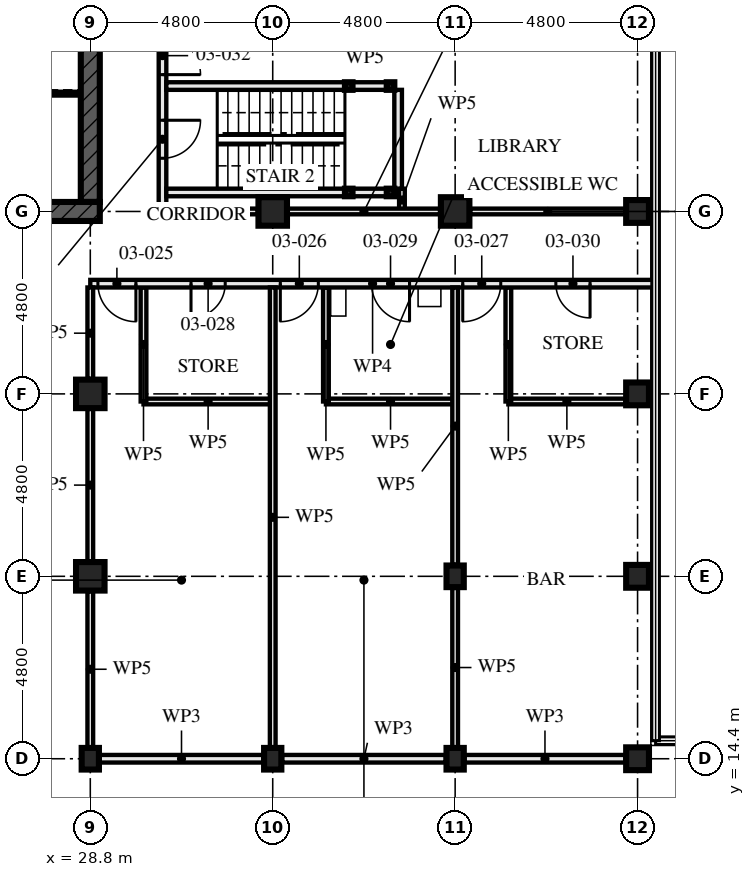
"""IFC4 building model, lengths in metres.
Left out: names, types, materials, properties, quantities, classifications, styles, units other than length and angle.
Written with IfcOpenShell. Run it as: python <this file> out.ifc"""

import sys

from ifc_helpers import new_model, si_unit, direction, frame, frame_2d, origin, origin_2d, place, context, subcontext, project, spatial, rectangle, hollow_rectangle, i_section, extrude, element, fill, save


model = new_model("IFC4")
c1 = context("Model", 3, precision=1e-05, world=origin(), true_north=direction((0.0, 1.0)))
c2 = subcontext(c1, "Body", "Model", "MODEL_VIEW")
j1 = project(units=[si_unit("LENGTHUNIT", "METRE"), si_unit("PLANEANGLEUNIT", "RADIAN")], contexts=[c1])
p1 = place(None, origin())
s1 = spatial("IfcSite", under=j1, at=p1, CompositionType="ELEMENT")
p2 = place(p1, origin())
s2 = spatial("IfcBuilding", under=s1, at=p2, CompositionType="ELEMENT")
p3 = place(p2, frame((0.0, 0.0, 13.5)))
s3 = spatial("IfcBuildingStorey", under=s2, at=p3, CompositionType="ELEMENT", Elevation=13.5)
p4 = place(p3, frame((28.8, 14.4, 0.0), z_axis=(0.0, 0.0, 1.0), x_axis=(1.0, 0.0, 0.0)))
e1 = element("IfcColumn", 1, at=p4, inside=s3, PredefinedType="COLUMN", context=c2, shape_type="SweptSolid", body=[
    extrude(i_section(OverallWidth=0.454, OverallDepth=0.569, WebThickness=0.078, FlangeThickness=0.125, FilletRadius=0.015, at=origin_2d()), origin(), (0.0, 0.0, 1.0), 4.5),
])
for number, where, z_axis, x_axis in (
    (2, (28.8, 19.2, 0.0), (0.0, 0.0, 1.0), (1.0, 0.0, 0.0)),
    (3, (28.8, 24.0, 0.0), (0.0, 0.0, 1.0), (1.0, 0.0, 0.0)),
):
    element("IfcColumn", number, at=place(p3, frame(where, z_axis=z_axis, x_axis=x_axis)), inside=s3, PredefinedType="COLUMN", context=c2, shape_type="SweptSolid", body=[
        extrude(hollow_rectangle(XDim=0.75, YDim=0.75, WallThickness=0.08, at=origin_2d()), origin(), (0.0, 0.0, 1.0), 4.5),
    ])
p5 = place(p3, frame((33.6, 14.4, 0.0), z_axis=(0.0, 0.0, 1.0), x_axis=(1.0, 0.0, 0.0)))
e4 = element("IfcColumn", 4, at=p5, inside=s3, PredefinedType="COLUMN", context=c2, shape_type="SweptSolid", body=[
    extrude(i_section(OverallWidth=0.454, OverallDepth=0.569, WebThickness=0.078, FlangeThickness=0.125, FilletRadius=0.015, at=origin_2d()), origin(), (0.0, 0.0, 1.0), 4.5),
])
p6 = place(p3, frame((33.6, 28.8, 0.0), z_axis=(0.0, 0.0, 1.0), x_axis=(0.0, 1.0, 0.0)))
e5 = element("IfcColumn", 5, at=p6, inside=s3, PredefinedType="COLUMN", context=c2, shape_type="SweptSolid", body=[
    extrude(hollow_rectangle(XDim=0.75, YDim=0.75, WallThickness=0.08, at=origin_2d()), origin(), (0.0, 0.0, 1.0), 4.5),
])
for number, where, z_axis, x_axis in (
    (6, (38.4, 14.4, 0.0), (0.0, 0.0, 1.0), (1.0, 0.0, 0.0)),
    (7, (38.4, 19.2, 0.0), (0.0, 0.0, 1.0), (1.0, 0.0, 0.0)),
):
    element("IfcColumn", number, at=place(p3, frame(where, z_axis=z_axis, x_axis=x_axis)), inside=s3, PredefinedType="COLUMN", context=c2, shape_type="SweptSolid", body=[
        extrude(i_section(OverallWidth=0.454, OverallDepth=0.569, WebThickness=0.078, FlangeThickness=0.125, FilletRadius=0.015, at=origin_2d()), origin(), (0.0, 0.0, 1.0), 4.5),
    ])
p7 = place(p3, frame((38.4, 28.8, 0.0), z_axis=(0.0, 0.0, 1.0), x_axis=(0.0, 1.0, 0.0)))
e8 = element("IfcColumn", 8, at=p7, inside=s3, PredefinedType="COLUMN", context=c2, shape_type="SweptSolid", body=[
    extrude(hollow_rectangle(XDim=0.75, YDim=0.75, WallThickness=0.08, at=origin_2d()), origin(), (0.0, 0.0, 1.0), 4.5),
])
p8 = place(p3, frame((43.2, 14.4, 0.0), z_axis=(0.0, 0.0, 1.0), x_axis=(0.0, 1.0, 0.0)))
e9 = element("IfcColumn", 9, at=p8, inside=s3, PredefinedType="COLUMN", context=c2, shape_type="SweptSolid", body=[
    extrude(hollow_rectangle(XDim=0.6, YDim=0.6, WallThickness=0.05, at=origin_2d()), origin(), (0.0, 0.0, 1.0), 4.5),
])
for number, where, z_axis, x_axis in (
    (10, (43.2, 19.2, 0.0), (0.0, 0.0, 1.0), (1.0, 0.0, 0.0)),
    (11, (43.2, 24.0, 0.0), (0.0, 0.0, 1.0), (1.0, 0.0, 0.0)),
    (12, (43.2, 28.8, 0.0), (0.0, 0.0, 1.0), (0.0, 1.0, 0.0)),
):
    element("IfcColumn", number, at=place(p3, frame(where, z_axis=z_axis, x_axis=x_axis)), inside=s3, PredefinedType="COLUMN", context=c2, shape_type="SweptSolid", body=[
        extrude(hollow_rectangle(XDim=0.6, YDim=0.6, WallThickness=0.08, at=origin_2d()), origin(), (0.0, 0.0, 1.0), 4.5),
    ])
p9 = place(p3, frame((14.15, 28.8, -0.17), z_axis=(0.0, 0.0, 1.0), x_axis=(1.0, 0.0, 0.0)))
e13 = element("IfcWall", 13, at=p9, inside=s3, PredefinedType="SHEAR", context=c2, shape_type="SweptSolid", body=[
    extrude(rectangle(XDim=14.9, YDim=0.5, at=frame_2d((7.45, 0.0))), origin(), (0.0, 0.0, 1.0), 4.5),
])
p10 = place(p9, frame((6.85, 0.0, 0.17)))
e14 = element("IfcOpeningElement", 14, at=p10, cuts=e13, PredefinedType="OPENING", context=c2, shape_type="SweptSolid", body=[
    extrude(rectangle(XDim=1.2, YDim=2.1, at=frame_2d((0.6, 1.05))), frame((0.0, 0.26, 0.0), z_axis=(0.0, -1.0, 0.0), x_axis=(1.0, 0.0, 0.0)), (0.0, 0.0, 1.0), 0.521),
])
p11 = place(p3, frame((28.8, 29.05, -0.17), z_axis=(0.0, 0.0, 1.0), x_axis=(0.0, 1.0, 0.0)))
e15 = element("IfcWall", 15, at=p11, inside=s3, PredefinedType="SHEAR", context=c2, shape_type="SweptSolid", body=[
    extrude(rectangle(XDim=13.9, YDim=0.5, at=frame_2d((6.95, 0.0))), origin(), (0.0, 0.0, 1.0), 4.5),
])
p12 = place(p11, frame((6.35, 0.0, 0.17)))
e16 = element("IfcOpeningElement", 16, at=p12, cuts=e15, PredefinedType="OPENING", context=c2, shape_type="SweptSolid", body=[
    extrude(rectangle(XDim=1.2, YDim=2.1, at=frame_2d((0.6, 1.05))), frame((0.0, 0.26, 0.0), z_axis=(0.0, -1.0, 0.0), x_axis=(1.0, 0.0, 0.0)), (0.0, 0.0, 1.0), 0.521),
])
for number, where, z_axis, x_axis in (
    (17, (36.7, 29.3, 0.0), (0.0, 0.0, 1.0), (1.0, 0.0, 0.0)),
    (18, (36.7, 32.1, 0.0), (0.0, 0.0, 1.0), (1.0, 0.0, 0.0)),
    (19, (35.6, 29.3, 0.0), (0.0, 0.0, 1.0), (1.0, 0.0, 0.0)),
    (20, (35.6, 32.1, 0.0), (0.0, 0.0, 1.0), (1.0, 0.0, 0.0)),
):
    element("IfcColumn", number, at=place(p3, frame(where, z_axis=z_axis, x_axis=x_axis)), inside=s3, PredefinedType="COLUMN", context=c2, shape_type="SweptSolid", body=[
        extrude(hollow_rectangle(XDim=0.2, YDim=0.2, WallThickness=0.008, at=origin_2d()), origin(), (0.0, 0.0, 1.0), 4.33),
    ])
p13 = place(p3, frame((30.2, 23.8, 0.0), z_axis=(0.0, 0.0, 1.0), x_axis=(0.0, 1.0, 0.0)))
e21 = element("IfcWall", 21, at=p13, inside=s3, PredefinedType="PARTITIONING", context=c2, shape_type="SweptSolid", body=[
    extrude(rectangle(XDim=3.0, YDim=0.15, at=frame_2d((1.5, 0.0))), origin(), (0.0, 0.0, 1.0), 3.55),
])
p14 = place(p3, frame((30.2, 23.8, 0.0), z_axis=(0.0, 0.0, 1.0), x_axis=(1.0, 0.0, 0.0)))
e22 = element("IfcWall", 22, at=p14, inside=s3, PredefinedType="PARTITIONING", context=c2, shape_type="SweptSolid", body=[
    extrude(rectangle(XDim=3.4, YDim=0.15, at=frame_2d((1.7, 0.0))), origin(), (0.0, 0.0, 1.0), 4.33),
])
p15 = place(p3, frame((35.0, 23.8, 0.0), z_axis=(0.0, 0.0, 1.0), x_axis=(0.0, 1.0, 0.0)))
e23 = element("IfcWall", 23, at=p15, inside=s3, PredefinedType="PARTITIONING", context=c2, shape_type="SweptSolid", body=[
    extrude(rectangle(XDim=3.0, YDim=0.15, at=frame_2d((1.5, 0.0))), origin(), (0.0, 0.0, 1.0), 3.55),
])
p16 = place(p3, frame((35.0, 23.8, 0.0), z_axis=(0.0, 0.0, 1.0), x_axis=(1.0, 0.0, 0.0)))
e24 = element("IfcWall", 24, at=p16, inside=s3, PredefinedType="PARTITIONING", context=c2, shape_type="SweptSolid", body=[
    extrude(rectangle(XDim=3.4, YDim=0.15, at=frame_2d((1.7, 0.0))), origin(), (0.0, 0.0, 1.0), 4.33),
])
p17 = place(p3, frame((39.8, 23.8, 0.0), z_axis=(0.0, 0.0, 1.0), x_axis=(0.0, 1.0, 0.0)))
e25 = element("IfcWall", 25, at=p17, inside=s3, PredefinedType="PARTITIONING", context=c2, shape_type="SweptSolid", body=[
    extrude(rectangle(XDim=3.0, YDim=0.15, at=frame_2d((1.5, 0.0))), origin(), (0.0, 0.0, 1.0), 3.55),
])
p18 = place(p3, frame((39.8, 23.8, 0.0), z_axis=(0.0, 0.0, 1.0), x_axis=(1.0, 0.0, 0.0)))
e26 = element("IfcWall", 26, at=p18, inside=s3, PredefinedType="PARTITIONING", context=c2, shape_type="SweptSolid", body=[
    extrude(rectangle(XDim=3.08, YDim=0.15, at=frame_2d((1.54, 0.0))), origin(), (0.0, 0.0, 1.0), 4.33),
])
p19 = place(p3, frame((33.6, 14.705, 0.0), z_axis=(0.0, 0.0, 1.0), x_axis=(0.0, 1.0, 0.0)))
e27 = element("IfcWall", 27, at=p19, inside=s3, PredefinedType="PARTITIONING", context=c2, shape_type="SweptSolid", body=[
    extrude(rectangle(XDim=12.095, YDim=0.15, at=frame_2d((6.048, 0.0))), origin(), (0.0, 0.0, 1.0), 3.55),
])
p20 = place(p3, frame((38.4, 14.705, 0.0), z_axis=(0.0, 0.0, 1.0), x_axis=(0.0, 1.0, 0.0)))
e28 = element("IfcWall", 28, at=p20, inside=s3, PredefinedType="PARTITIONING", context=c2, shape_type="SweptSolid", body=[
    extrude(rectangle(XDim=4.191, YDim=0.15, at=frame_2d((2.095, 0.0))), origin(), (0.0, 0.0, 1.0), 3.55),
])
p21 = place(p3, frame((38.4, 19.504, 0.0), z_axis=(0.0, 0.0, 1.0), x_axis=(0.0, 1.0, 0.0)))
e29 = element("IfcWall", 29, at=p21, inside=s3, PredefinedType="PARTITIONING", context=c2, shape_type="SweptSolid", body=[
    extrude(rectangle(XDim=7.296, YDim=0.15, at=frame_2d((3.648, 0.0))), origin(), (0.0, 0.0, 1.0), 3.55),
])
p22 = place(p3, frame((28.8, 26.9, 0.0), z_axis=(0.0, 0.0, 1.0), x_axis=(1.0, 0.0, 0.0)))
e30 = element("IfcWall", 30, at=p22, inside=s3, PredefinedType="PARTITIONING", context=c2, shape_type="SweptSolid", body=[
    extrude(rectangle(XDim=14.855, YDim=0.2, at=frame_2d((7.427, 0.0))), origin(), (0.0, 0.0, 1.0), 3.32),
])
p23 = place(p22, frame((0.2, 0.0, 0.0)))
e31 = element("IfcOpeningElement", 31, at=p23, cuts=e30, PredefinedType="OPENING", context=c2, shape_type="SweptSolid", body=[
    extrude(rectangle(XDim=1.0, YDim=2.4, at=frame_2d((0.5, 1.2))), frame((0.0, 0.111, 0.0), z_axis=(0.0, -1.0, 0.0), x_axis=(1.0, 0.0, 0.0)), (0.0, 0.0, 1.0), 0.221),
])
p24 = place(p22, frame((5.0, 0.0, 0.0)))
e32 = element("IfcOpeningElement", 32, at=p24, cuts=e30, PredefinedType="OPENING", context=c2, shape_type="SweptSolid", body=[
    extrude(rectangle(XDim=1.0, YDim=2.4, at=frame_2d((0.5, 1.2))), frame((0.0, 0.111, 0.0), z_axis=(0.0, -1.0, 0.0), x_axis=(1.0, 0.0, 0.0)), (0.0, 0.0, 1.0), 0.221),
])
p25 = place(p22, frame((9.8, 0.0, 0.0)))
e33 = element("IfcOpeningElement", 33, at=p25, cuts=e30, PredefinedType="OPENING", context=c2, shape_type="SweptSolid", body=[
    extrude(rectangle(XDim=1.0, YDim=2.4, at=frame_2d((0.5, 1.2))), frame((0.0, 0.111, 0.0), z_axis=(0.0, -1.0, 0.0), x_axis=(1.0, 0.0, 0.0)), (0.0, 0.0, 1.0), 0.221),
])
p26 = place(p22, frame((2.65, 0.0, 0.0)))
e34 = element("IfcOpeningElement", 34, at=p26, cuts=e30, PredefinedType="OPENING", context=c2, shape_type="SweptSolid", body=[
    extrude(rectangle(XDim=0.9, YDim=2.1, at=frame_2d((0.45, 1.05))), frame((0.0, 0.111, 0.0), z_axis=(0.0, -1.0, 0.0), x_axis=(1.0, 0.0, 0.0)), (0.0, 0.0, 1.0), 0.221),
])
p27 = place(p22, frame((7.4, 0.0, 0.0)))
e35 = element("IfcOpeningElement", 35, at=p27, cuts=e30, PredefinedType="OPENING", context=c2, shape_type="SweptSolid", body=[
    extrude(rectangle(XDim=1.0, YDim=2.1, at=frame_2d((0.5, 1.05))), frame((0.0, 0.111, 0.0), z_axis=(0.0, -1.0, 0.0), x_axis=(1.0, 0.0, 0.0)), (0.0, 0.0, 1.0), 0.221),
])
p28 = place(p22, frame((12.25, 0.0, 0.0)))
e36 = element("IfcOpeningElement", 36, at=p28, cuts=e30, PredefinedType="OPENING", context=c2, shape_type="SweptSolid", body=[
    extrude(rectangle(XDim=0.9, YDim=2.1, at=frame_2d((0.45, 1.05))), frame((0.0, 0.111, 0.0), z_axis=(0.0, -1.0, 0.0), x_axis=(1.0, 0.0, 0.0)), (0.0, 0.0, 1.0), 0.221),
])
p29 = place(p3, frame((36.6, 29.3, 0.0), z_axis=(0.0, 0.0, 1.0), x_axis=(-1.0, 0.0, 0.0)))
e37 = element("IfcWall", 37, at=p29, inside=s3, PredefinedType="SOLIDWALL", context=c2, shape_type="SweptSolid", body=[
    extrude(rectangle(XDim=0.9, YDim=0.2, at=frame_2d((0.45, 0.0))), origin(), (0.0, 0.0, 1.0), 3.99),
])
p30 = place(p3, frame((35.5, 29.3, 0.0), z_axis=(0.0, 0.0, 1.0), x_axis=(-1.0, 0.0, 0.0)))
e38 = element("IfcWall", 38, at=p30, inside=s3, PredefinedType="SOLIDWALL", context=c2, shape_type="SweptSolid", body=[
    extrude(rectangle(XDim=4.7, YDim=0.2, at=frame_2d((2.35, 0.0))), origin(), (0.0, 0.0, 1.0), 3.99),
])
p31 = place(p3, frame((36.6, 32.1, 0.0), z_axis=(0.0, 0.0, 1.0), x_axis=(-1.0, 0.0, 0.0)))
e39 = element("IfcWall", 39, at=p31, inside=s3, PredefinedType="SOLIDWALL", context=c2, shape_type="SweptSolid", body=[
    extrude(rectangle(XDim=0.9, YDim=0.2, at=frame_2d((0.45, 0.0))), origin(), (0.0, 0.0, 1.0), 3.99),
])
p32 = place(p3, frame((35.5, 32.1, 0.0), z_axis=(0.0, 0.0, 1.0), x_axis=(-1.0, 0.0, 0.0)))
e40 = element("IfcWall", 40, at=p32, inside=s3, PredefinedType="SOLIDWALL", context=c2, shape_type="SweptSolid", body=[
    extrude(rectangle(XDim=4.7, YDim=0.2, at=frame_2d((2.35, 0.0))), origin(), (0.0, 0.0, 1.0), 3.99),
])
p33 = place(p3, frame((36.9, 29.4, 0.0), z_axis=(0.0, 0.0, 1.0), x_axis=(0.0, 1.0, 0.0)))
e41 = element("IfcWall", 41, at=p33, inside=s3, PredefinedType="SOLIDWALL", context=c2, shape_type="SweptSolid", body=[
    extrude(rectangle(XDim=2.6, YDim=0.2, at=frame_2d((1.3, 0.0))), origin(), (0.0, 0.0, 1.0), 4.33),
])
p34 = place(p3, frame((37.0, 28.8, 0.0), z_axis=(0.0, 0.0, 1.0), x_axis=(0.0, 1.0, 0.0)))
e42 = element("IfcWall", 42, at=p34, inside=s3, PredefinedType="PARTITIONING", context=c2, shape_type="SweptSolid", body=[
    extrude(rectangle(XDim=0.6, YDim=0.15, at=frame_2d((0.3, 0.0))), origin(), (0.0, 0.0, 1.0), 4.33),
])
p35 = place(p3, frame((30.7, 28.8, 0.0), z_axis=(0.0, 0.0, 1.0), x_axis=(0.0, 1.0, 0.0)))
e43 = element("IfcWall", 43, at=p35, inside=s3, PredefinedType="PARTITIONING", context=c2, shape_type="SweptSolid", body=[
    extrude(rectangle(XDim=14.4, YDim=0.2, at=frame_2d((7.2, 0.0))), origin(), (0.0, 0.0, 1.0), 3.55),
])
p36 = place(p35, frame((1.4, 0.0, 0.0)))
e44 = element("IfcOpeningElement", 44, at=p36, cuts=e43, PredefinedType="OPENING", context=c2, shape_type="SweptSolid", body=[
    extrude(rectangle(XDim=1.0, YDim=2.1, at=frame_2d((0.5, 1.05))), frame((0.0, 0.111, 0.0), z_axis=(0.0, -1.0, 0.0), x_axis=(1.0, 0.0, 0.0)), (0.0, 0.0, 1.0), 0.221),
])
p37 = place(p35, frame((3.6, 0.0, 0.0)))
e45 = element("IfcOpeningElement", 45, at=p37, cuts=e43, PredefinedType="OPENING", context=c2, shape_type="SweptSolid", body=[
    extrude(rectangle(XDim=1.0, YDim=2.4, at=frame_2d((0.5, 1.2))), frame((0.0, 0.111, 0.0), z_axis=(0.0, -1.0, 0.0), x_axis=(1.0, 0.0, 0.0)), (0.0, 0.0, 1.0), 0.221),
])
p38 = place(p35, frame((5.0, 0.0, 0.0)))
e46 = element("IfcOpeningElement", 46, at=p38, cuts=e43, PredefinedType="OPENING", context=c2, shape_type="SweptSolid", body=[
    extrude(rectangle(XDim=1.0, YDim=2.4, at=frame_2d((0.5, 1.2))), frame((0.0, 0.111, 0.0), z_axis=(0.0, -1.0, 0.0), x_axis=(1.0, 0.0, 0.0)), (0.0, 0.0, 1.0), 0.221),
])
p39 = place(p35, frame((9.8, 0.0, 0.0)))
e47 = element("IfcOpeningElement", 47, at=p39, cuts=e43, PredefinedType="OPENING", context=c2, shape_type="SweptSolid", body=[
    extrude(rectangle(XDim=1.0, YDim=2.4, at=frame_2d((0.5, 1.2))), frame((0.0, 0.111, 0.0), z_axis=(0.0, -1.0, 0.0), x_axis=(1.0, 0.0, 0.0)), (0.0, 0.0, 1.0), 0.221),
])
p40 = place(p35, frame((7.45, 0.0, 0.0)))
e48 = element("IfcOpeningElement", 48, at=p40, cuts=e43, PredefinedType="OPENING", context=c2, shape_type="SweptSolid", body=[
    extrude(rectangle(XDim=0.9, YDim=2.1, at=frame_2d((0.45, 1.05))), frame((0.0, 0.111, 0.0), z_axis=(0.0, -1.0, 0.0), x_axis=(1.0, 0.0, 0.0)), (0.0, 0.0, 1.0), 0.221),
])
p41 = place(p35, frame((12.2, 0.0, 0.0)))
e49 = element("IfcOpeningElement", 49, at=p41, cuts=e43, PredefinedType="OPENING", context=c2, shape_type="SweptSolid", body=[
    extrude(rectangle(XDim=1.0, YDim=2.1, at=frame_2d((0.5, 1.05))), frame((0.0, 0.111, 0.0), z_axis=(0.0, -1.0, 0.0), x_axis=(1.0, 0.0, 0.0)), (0.0, 0.0, 1.0), 0.221),
])
p42 = place(p3, frame((29.047, 14.4, 0.0), z_axis=(0.0, 0.0, 1.0), x_axis=(1.0, 0.0, 0.0)))
e50 = element("IfcWall", 50, at=p42, inside=s3, PredefinedType="PARTITIONING", context=c2, shape_type="SweptSolid", body=[
    extrude(rectangle(XDim=4.306, YDim=0.2, at=frame_2d((2.153, 0.0))), origin(), (0.0, 0.0, 1.0), 3.32),
])
p43 = place(p3, frame((33.847, 14.4, 0.0), z_axis=(0.0, 0.0, 1.0), x_axis=(1.0, 0.0, 0.0)))
e51 = element("IfcWall", 51, at=p43, inside=s3, PredefinedType="PARTITIONING", context=c2, shape_type="SweptSolid", body=[
    extrude(rectangle(XDim=4.306, YDim=0.2, at=frame_2d((2.153, 0.0))), origin(), (0.0, 0.0, 1.0), 3.32),
])
p44 = place(p3, frame((38.647, 14.4, 0.0), z_axis=(0.0, 0.0, 1.0), x_axis=(1.0, 0.0, 0.0)))
e52 = element("IfcWall", 52, at=p44, inside=s3, PredefinedType="PARTITIONING", context=c2, shape_type="SweptSolid", body=[
    extrude(rectangle(XDim=4.233, YDim=0.2, at=frame_2d((2.116, 0.0))), origin(), (0.0, 0.0, 1.0), 3.32),
])
p45 = place(p3, frame((23.15, 31.9, 0.0), z_axis=(0.0, 0.0, 1.0), x_axis=(1.0, 0.0, 0.0)))
e53 = element("IfcWall", 53, at=p45, inside=s3, PredefinedType="SOLIDWALL", context=c2, shape_type="SweptSolid", body=[
    extrude(rectangle(XDim=5.4, YDim=0.1, at=frame_2d((2.7, 0.0))), origin(), (0.0, 0.0, 1.0), 4.33),
])
p46 = place(p3, frame((28.8, 14.705, 0.0), z_axis=(0.0, 0.0, 1.0), x_axis=(0.0, 1.0, 0.0)))
e54 = element("IfcWall", 54, at=p46, inside=s3, PredefinedType="PARTITIONING", context=c2, shape_type="SweptSolid", body=[
    extrude(rectangle(XDim=4.1, YDim=0.15, at=frame_2d((2.05, 0.0))), origin(), (0.0, 0.0, 1.0), 3.32),
])
p47 = place(p3, frame((28.8, 19.595, 0.0), z_axis=(0.0, 0.0, 1.0), x_axis=(0.0, 1.0, 0.0)))
e55 = element("IfcWall", 55, at=p47, inside=s3, PredefinedType="PARTITIONING", context=c2, shape_type="SweptSolid", body=[
    extrude(rectangle(XDim=4.01, YDim=0.15, at=frame_2d((2.005, 0.0))), origin(), (0.0, 0.0, 1.0), 3.32),
])
p48 = place(p3, frame((28.8, 24.395, 0.0), z_axis=(0.0, 0.0, 1.0), x_axis=(0.0, 1.0, 0.0)))
e56 = element("IfcWall", 56, at=p48, inside=s3, PredefinedType="PARTITIONING", context=c2, shape_type="SweptSolid", body=[
    extrude(rectangle(XDim=2.405, YDim=0.15, at=frame_2d((1.203, 0.0))), origin(), (0.0, 0.0, 1.0), 3.32),
])
p49 = place(p3, frame((42.88, 28.8, 0.0), z_axis=(0.0, 0.0, 1.0), x_axis=(-1.0, 0.0, 0.0)))
e57 = element("IfcWall", 57, at=p49, inside=s3, PredefinedType="PARTITIONING", context=c2, shape_type="SweptSolid", body=[
    extrude(rectangle(XDim=4.085, YDim=0.15, at=frame_2d((2.042, 0.0))), origin(), (0.0, 0.0, 1.0), 3.32),
])
p50 = place(p3, frame((38.005, 28.8, 0.0), z_axis=(0.0, 0.0, 1.0), x_axis=(-1.0, 0.0, 0.0)))
e58 = element("IfcWall", 58, at=p50, inside=s3, PredefinedType="PARTITIONING", context=c2, shape_type="SweptSolid", body=[
    extrude(rectangle(XDim=4.01, YDim=0.15, at=frame_2d((2.005, 0.0))), origin(), (0.0, 0.0, 1.0), 3.32),
])
p51 = place(p3, frame((33.205, 28.8, 0.0), z_axis=(0.0, 0.0, 1.0), x_axis=(-1.0, 0.0, 0.0)))
e59 = element("IfcWall", 59, at=p51, inside=s3, PredefinedType="PARTITIONING", context=c2, shape_type="SweptSolid", body=[
    extrude(rectangle(XDim=2.505, YDim=0.15, at=frame_2d((1.252, 0.0))), origin(), (0.0, 0.0, 1.0), 3.32),
])
p52 = place(p23, frame((1.0, 0.0, 0.0), z_axis=(0.0, 0.0, 1.0), x_axis=(-1.0, 0.0, 0.0)))
e60 = element("IfcDoor", 60, at=p52, inside=s3, OperationType="SINGLE_SWING_RIGHT", PredefinedType="DOOR", context=c2, shape_type="SweptSolid", body=[
    extrude(rectangle(XDim=1.0, YDim=2.4, at=frame_2d((0.5, 1.2))), frame((0.0, 0.027, 0.0), z_axis=(0.0, -1.0, 0.0), x_axis=(1.0, 0.0, 0.0)), (0.0, 0.0, 1.0), 0.054),
])
fill(e31, e60)
p53 = place(p24, frame((1.0, 0.0, 0.0), z_axis=(0.0, 0.0, 1.0), x_axis=(-1.0, 0.0, 0.0)))
e61 = element("IfcDoor", 61, at=p53, inside=s3, OperationType="SINGLE_SWING_LEFT", PredefinedType="DOOR", context=c2, shape_type="SweptSolid", body=[
    extrude(rectangle(XDim=1.0, YDim=2.4, at=frame_2d((0.5, 1.2))), frame((0.0, 0.027, 0.0), z_axis=(0.0, -1.0, 0.0), x_axis=(1.0, 0.0, 0.0)), (0.0, 0.0, 1.0), 0.054),
])
fill(e32, e61)
p54 = place(p25, frame((1.0, 0.0, 0.0), z_axis=(0.0, 0.0, 1.0), x_axis=(-1.0, 0.0, 0.0)))
e62 = element("IfcDoor", 62, at=p54, inside=s3, OperationType="SINGLE_SWING_LEFT", PredefinedType="DOOR", context=c2, shape_type="SweptSolid", body=[
    extrude(rectangle(XDim=1.0, YDim=2.4, at=frame_2d((0.5, 1.2))), frame((0.0, 0.027, 0.0), z_axis=(0.0, -1.0, 0.0), x_axis=(1.0, 0.0, 0.0)), (0.0, 0.0, 1.0), 0.054),
])
fill(e33, e62)
p55 = place(p26, frame((0.9, 0.0, 0.0), z_axis=(0.0, 0.0, 1.0), x_axis=(-1.0, 0.0, 0.0)))
e63 = element("IfcDoor", 63, at=p55, inside=s3, OperationType="SINGLE_SWING_LEFT", PredefinedType="DOOR", context=c2, shape_type="SweptSolid", body=[
    extrude(rectangle(XDim=0.9, YDim=2.1, at=frame_2d((0.45, 1.05))), frame((0.0, 0.027, 0.0), z_axis=(0.0, -1.0, 0.0), x_axis=(1.0, 0.0, 0.0)), (0.0, 0.0, 1.0), 0.054),
])
fill(e34, e63)
p56 = place(p27, frame((1.0, 0.0, 0.0), z_axis=(0.0, 0.0, 1.0), x_axis=(-1.0, 0.0, 0.0)))
e64 = element("IfcDoor", 64, at=p56, inside=s3, OperationType="SINGLE_SWING_RIGHT", PredefinedType="DOOR", context=c2, shape_type="SweptSolid", body=[
    extrude(rectangle(XDim=1.0, YDim=2.1, at=frame_2d((0.5, 1.05))), frame((0.0, 0.027, 0.0), z_axis=(0.0, -1.0, 0.0), x_axis=(1.0, 0.0, 0.0)), (0.0, 0.0, 1.0), 0.054),
])
fill(e35, e64)
p57 = place(p28, frame((0.9, 0.0, 0.0), z_axis=(0.0, 0.0, 1.0), x_axis=(-1.0, 0.0, 0.0)))
e65 = element("IfcDoor", 65, at=p57, inside=s3, OperationType="SINGLE_SWING_RIGHT", PredefinedType="DOOR", context=c2, shape_type="SweptSolid", body=[
    extrude(rectangle(XDim=0.9, YDim=2.1, at=frame_2d((0.45, 1.05))), frame((0.0, 0.027, 0.0), z_axis=(0.0, -1.0, 0.0), x_axis=(1.0, 0.0, 0.0)), (0.0, 0.0, 1.0), 0.054),
])
fill(e36, e65)
p58 = place(p36, frame((1.0, 0.0, 0.0), z_axis=(0.0, 0.0, 1.0), x_axis=(-1.0, 0.0, 0.0)))
e66 = element("IfcDoor", 66, at=p58, inside=s3, OperationType="SINGLE_SWING_RIGHT", PredefinedType="DOOR", context=c2, shape_type="SweptSolid", body=[
    extrude(rectangle(XDim=1.0, YDim=2.1, at=frame_2d((0.5, 1.05))), frame((0.0, 0.032, 0.0), z_axis=(0.0, -1.0, 0.0), x_axis=(1.0, 0.0, 0.0)), (0.0, 0.0, 1.0), 0.064),
])
fill(e44, e66)
p59 = place(p37, frame((1.0, 0.0, 0.0), z_axis=(0.0, 0.0, 1.0), x_axis=(-1.0, 0.0, 0.0)))
e67 = element("IfcDoor", 67, at=p59, inside=s3, OperationType="SINGLE_SWING_LEFT", PredefinedType="DOOR", context=c2, shape_type="SweptSolid", body=[
    extrude(rectangle(XDim=1.0, YDim=2.4, at=frame_2d((0.5, 1.2))), frame((0.0, 0.027, 0.0), z_axis=(0.0, -1.0, 0.0), x_axis=(1.0, 0.0, 0.0)), (0.0, 0.0, 1.0), 0.054),
])
fill(e45, e67)
save(model, sys.argv[1])
